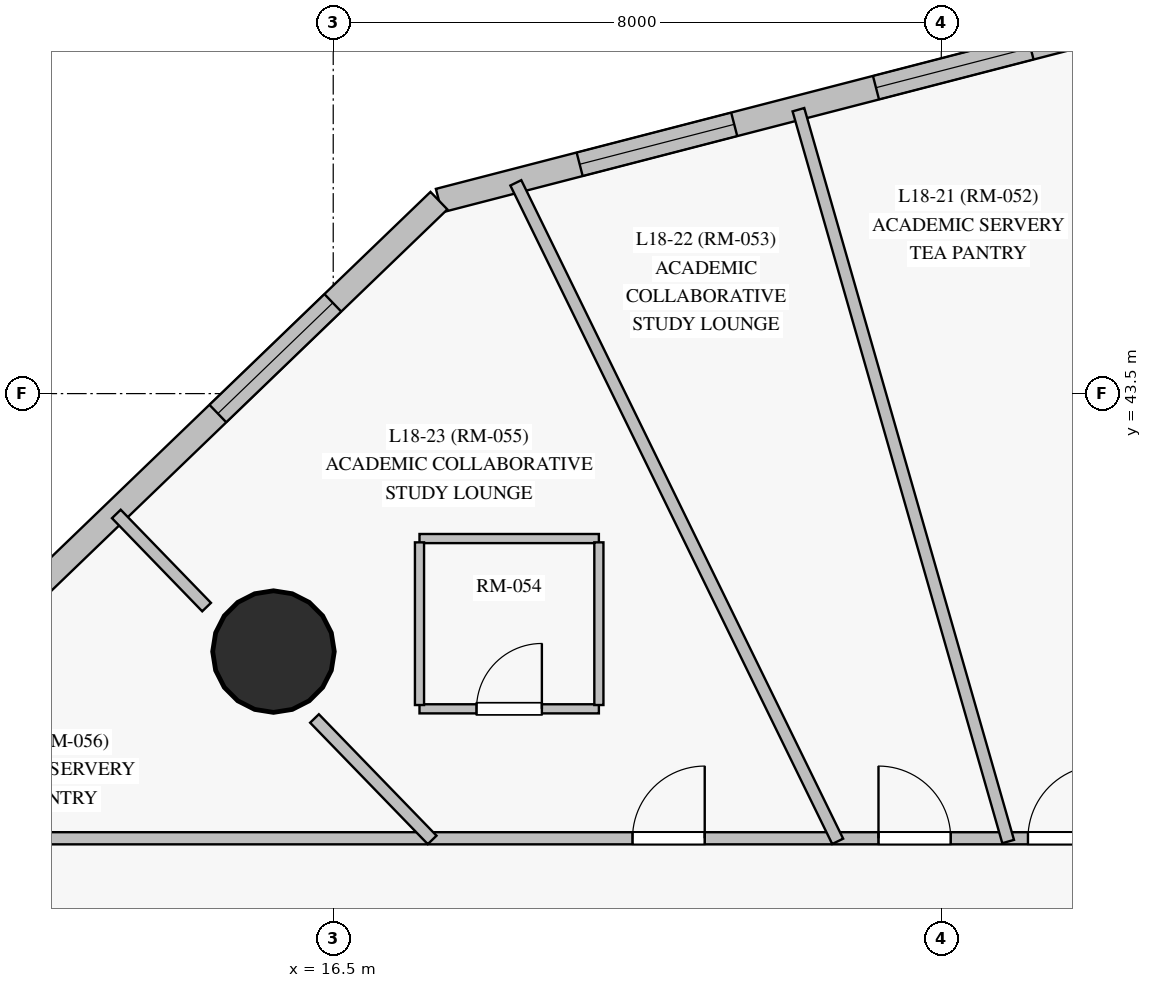
"""IFC4 building model, lengths in metres.
Left out: names, types, materials, properties, quantities, classifications, styles, units other than length and angle.
Written with IfcOpenShell. Run it as: python <this file> out.ifc"""

import sys

from ifc_helpers import new_model, si_unit, direction, frame, frame_2d, origin, origin_with_axes, origin_2d, place, context, subcontext, project, spatial, rectangle, circle, extrude, source, transform, mapped, element, fill, save


model = new_model("IFC4")
c1 = context("Model", 3, precision=1e-05, world=origin(), true_north=direction((0.0, 1.0)))
c2 = subcontext(c1, "Body", "Model", "MODEL_VIEW")
j1 = project(units=[si_unit("LENGTHUNIT", "METRE"), si_unit("PLANEANGLEUNIT", "RADIAN")], contexts=[c1])
p1 = place(None, origin())
s1 = spatial("IfcSite", under=j1, at=p1, CompositionType="ELEMENT")
p2 = place(p1, origin())
s2 = spatial("IfcBuilding", under=s1, at=p2, CompositionType="ELEMENT")
p3 = place(p2, frame((0.0, 0.0, 69.7)))
s3 = spatial("IfcBuildingStorey", under=s2, at=p3, CompositionType="ELEMENT", Elevation=69.7)
m1 = source(origin_with_axes(), c2, "Body", "SweptSolid", [
    extrude(circle(Radius=0.8, at=origin_2d()), origin(), (0.0, 0.0, 1.0), 3.6),
])
p4 = place(p3, frame((15.714, 40.106, 0.0), z_axis=(0.0, 0.0, 1.0), x_axis=(1.0, 0.0, 0.0)))
e1 = element("IfcColumn", 1, at=p4, inside=s3, PredefinedType="COLUMN", context=c2, shape_type="MappedRepresentation", body=[
    mapped(m1, transform((0.0, 0.0, 0.0), scale=1.0)),
])
p5 = place(p3, frame((32.152, 49.724, 0.0), z_axis=(0.0, 0.0, 1.0), x_axis=(-0.968190331719, -0.250214870793, 0.0)))
e2 = element("IfcWall", 2, at=p5, inside=s3, PredefinedType="SOLIDWALL", context=c2, shape_type="SweptSolid", body=[
    extrude(rectangle(XDim=14.729, YDim=0.32, at=frame_2d((7.365, 0.0))), origin(), (0.0, 0.0, 1.0), 3.35),
])
p6 = place(p5, frame((1.795, 0.0, 0.85)))
e3 = element("IfcOpeningElement", 3, at=p6, cuts=e2, PredefinedType="OPENING", context=c2, shape_type="SweptSolid", body=[
    extrude(rectangle(XDim=2.1, YDim=1.95, at=frame_2d((1.05, 0.975))), frame((0.0, 0.17, 0.0), z_axis=(0.0, -1.0, 0.0), x_axis=(1.0, 0.0, 0.0)), (0.0, 0.0, 1.0), 0.34),
])
p7 = place(p5, frame((6.691, 0.0, 0.85)))
e4 = element("IfcOpeningElement", 4, at=p7, cuts=e2, PredefinedType="OPENING", context=c2, shape_type="SweptSolid", body=[
    extrude(rectangle(XDim=2.1, YDim=1.95, at=frame_2d((1.05, 0.975))), frame((0.0, 0.17, 0.0), z_axis=(0.0, -1.0, 0.0), x_axis=(1.0, 0.0, 0.0)), (0.0, 0.0, 1.0), 0.34),
])
p8 = place(p5, frame((10.717, 0.0, 0.85)))
e5 = element("IfcOpeningElement", 5, at=p8, cuts=e2, PredefinedType="OPENING", context=c2, shape_type="SweptSolid", body=[
    extrude(rectangle(XDim=2.1, YDim=1.95, at=frame_2d((1.05, 0.975))), frame((0.0, 0.17, 0.0), z_axis=(0.0, -1.0, 0.0), x_axis=(1.0, 0.0, 0.0)), (0.0, 0.0, 1.0), 0.34),
])
p9 = place(p3, frame((17.891, 46.039, 0.0), z_axis=(0.0, 0.0, 1.0), x_axis=(-0.720301487299, -0.693661132971, 0.0)))
e6 = element("IfcWall", 6, at=p9, inside=s3, PredefinedType="SOLIDWALL", context=c2, shape_type="SweptSolid", body=[
    extrude(rectangle(XDim=11.822, YDim=0.32, at=frame_2d((5.911, 0.0))), origin(), (0.0, 0.0, 1.0), 3.35),
])
p10 = place(p9, frame((1.938, 0.0, 0.85)))
e7 = element("IfcOpeningElement", 7, at=p10, cuts=e6, PredefinedType="OPENING", context=c2, shape_type="SweptSolid", body=[
    extrude(rectangle(XDim=2.1, YDim=1.95, at=frame_2d((1.05, 0.975))), frame((0.0, 0.17, 0.0), z_axis=(0.0, -1.0, 0.0), x_axis=(1.0, 0.0, 0.0)), (0.0, 0.0, 1.0), 0.34),
])
p11 = place(p9, frame((7.789, 0.0, 0.85)))
e8 = element("IfcOpeningElement", 8, at=p11, cuts=e6, PredefinedType="OPENING", context=c2, shape_type="SweptSolid", body=[
    extrude(rectangle(XDim=2.1, YDim=1.95, at=frame_2d((1.05, 0.975))), frame((0.0, 0.17, 0.0), z_axis=(0.0, -1.0, 0.0), x_axis=(1.0, 0.0, 0.0)), (0.0, 0.0, 1.0), 0.34),
])
p12 = place(p3, frame((10.5, 37.65, 0.0), z_axis=(0.0, 0.0, 1.0), x_axis=(1.0, 0.0, 0.0)))
e9 = element("IfcWall", 9, at=p12, inside=s3, PredefinedType="PARTITIONING", context=c2, shape_type="SweptSolid", body=[
    extrude(rectangle(XDim=29.75, YDim=0.16, at=frame_2d((14.875, 0.0))), origin(), (0.0, 0.0, 1.0), 2.75),
])
p13 = place(p12, frame((27.85, 0.0, 0.0)))
e10 = element("IfcOpeningElement", 10, at=p13, cuts=e9, PredefinedType="OPENING", context=c2, shape_type="SweptSolid", body=[
    extrude(rectangle(XDim=0.95, YDim=2.15, at=frame_2d((0.475, 1.075))), frame((0.0, 0.09, 0.0), z_axis=(0.0, -1.0, 0.0), x_axis=(1.0, 0.0, 0.0)), (0.0, 0.0, 1.0), 0.18),
])
p14 = place(p12, frame((25.159, 0.0, 0.0)))
e11 = element("IfcOpeningElement", 11, at=p14, cuts=e9, PredefinedType="OPENING", context=c2, shape_type="SweptSolid", body=[
    extrude(rectangle(XDim=0.96, YDim=2.15, at=frame_2d((0.48, 1.075))), frame((0.0, 0.09, 0.0), z_axis=(0.0, -1.0, 0.0), x_axis=(1.0, 0.0, 0.0)), (0.0, 0.0, 1.0), 0.18),
])
p15 = place(p12, frame((21.837, 0.0, 0.0)))
e12 = element("IfcOpeningElement", 12, at=p15, cuts=e9, PredefinedType="OPENING", context=c2, shape_type="SweptSolid", body=[
    extrude(rectangle(XDim=0.95, YDim=2.15, at=frame_2d((0.475, 1.075))), frame((0.0, 0.09, 0.0), z_axis=(0.0, -1.0, 0.0), x_axis=(1.0, 0.0, 0.0)), (0.0, 0.0, 1.0), 0.18),
])
p16 = place(p12, frame((18.863, 0.0, 0.0)))
e13 = element("IfcOpeningElement", 13, at=p16, cuts=e9, PredefinedType="OPENING", context=c2, shape_type="SweptSolid", body=[
    extrude(rectangle(XDim=0.95, YDim=2.15, at=frame_2d((0.475, 1.075))), frame((0.0, 0.09, 0.0), z_axis=(0.0, -1.0, 0.0), x_axis=(1.0, 0.0, 0.0)), (0.0, 0.0, 1.0), 0.18),
])
p17 = place(p12, frame((15.14, 0.0, 0.0)))
e14 = element("IfcOpeningElement", 14, at=p17, cuts=e9, PredefinedType="OPENING", context=c2, shape_type="SweptSolid", body=[
    extrude(rectangle(XDim=0.96, YDim=2.15, at=frame_2d((0.48, 1.075))), frame((0.0, 0.09, 0.0), z_axis=(0.0, -1.0, 0.0), x_axis=(1.0, 0.0, 0.0)), (0.0, 0.0, 1.0), 0.18),
])
p18 = place(p12, frame((13.174, 0.0, 0.0)))
e15 = element("IfcOpeningElement", 15, at=p18, cuts=e9, PredefinedType="OPENING", context=c2, shape_type="SweptSolid", body=[
    extrude(rectangle(XDim=0.95, YDim=2.15, at=frame_2d((0.475, 1.075))), frame((0.0, 0.09, 0.0), z_axis=(0.0, -1.0, 0.0), x_axis=(1.0, 0.0, 0.0)), (0.0, 0.0, 1.0), 0.18),
])
p19 = place(p12, frame((9.938, 0.0, 0.0)))
e16 = element("IfcOpeningElement", 16, at=p19, cuts=e9, PredefinedType="OPENING", context=c2, shape_type="SweptSolid", body=[
    extrude(rectangle(XDim=0.95, YDim=2.15, at=frame_2d((0.475, 1.075))), frame((0.0, 0.09, 0.0), z_axis=(0.0, -1.0, 0.0), x_axis=(1.0, 0.0, 0.0)), (0.0, 0.0, 1.0), 0.18),
])
p20 = place(p3, frame((25.379, 37.607, 0.0), z_axis=(0.0, 0.0, 1.0), x_axis=(-0.275487246275, 0.961304726473, 0.0)))
e17 = element("IfcWall", 17, at=p20, inside=s3, PredefinedType="PARTITIONING", context=c2, shape_type="SweptSolid", body=[
    extrude(rectangle(XDim=10.016, YDim=0.16, at=frame_2d((5.008, 0.0))), origin(), (0.0, 0.0, 1.0), 3.35),
])
p21 = place(p3, frame((23.137, 37.61, 0.0), z_axis=(0.0, 0.0, 1.0), x_axis=(-0.439133840218, 0.898421655113, 0.0)))
e18 = element("IfcWall", 18, at=p21, inside=s3, PredefinedType="PARTITIONING", context=c2, shape_type="SweptSolid", body=[
    extrude(rectangle(XDim=9.643, YDim=0.16, at=frame_2d((4.821, 0.0))), origin(), (0.0, 0.0, 1.0), 3.35),
])
p22 = place(p3, frame((17.635, 39.353, 0.0), z_axis=(0.0, 0.0, 1.0), x_axis=(1.0, 0.0, 0.0)))
e19 = element("IfcWall", 19, at=p22, inside=s3, PredefinedType="PARTITIONING", context=c2, shape_type="SweptSolid", body=[
    extrude(rectangle(XDim=2.36, YDim=0.12, at=frame_2d((1.18, 0.0))), origin(), (0.0, 0.0, 1.0), 2.75),
])
p23 = place(p22, frame((0.75, 0.0, 0.0)))
e20 = element("IfcOpeningElement", 20, at=p23, cuts=e19, PredefinedType="OPENING", context=c2, shape_type="SweptSolid", body=[
    extrude(rectangle(XDim=0.86, YDim=2.1, at=frame_2d((0.43, 1.05))), frame((0.0, 0.07, 0.0), z_axis=(0.0, -1.0, 0.0), x_axis=(1.0, 0.0, 0.0)), (0.0, 0.0, 1.0), 0.14),
])
p24 = place(p3, frame((19.995, 41.593, 0.0), z_axis=(0.0, 0.0, 1.0), x_axis=(-1.0, 0.0, 0.0)))
e21 = element("IfcWall", 21, at=p24, inside=s3, PredefinedType="PARTITIONING", context=c2, shape_type="SweptSolid", body=[
    extrude(rectangle(XDim=2.36, YDim=0.12, at=frame_2d((1.18, 0.0))), origin(), (0.0, 0.0, 1.0), 2.75),
])
p25 = place(p3, frame((17.802, 37.628, 0.0), z_axis=(0.0, 0.0, 1.0), x_axis=(-0.695823523946, 0.718212798218, 0.0)))
e22 = element("IfcWall", 22, at=p25, inside=s3, PredefinedType="PARTITIONING", context=c2, shape_type="SweptSolid", body=[
    extrude(rectangle(XDim=2.225, YDim=0.16, at=frame_2d((1.112, 0.0))), origin(), (0.0, 0.0, 1.0), 2.7),
])
for number, where, z_axis, x_axis in (
    (23, (19.995, 39.403, 0.0), (0.0, 0.0, 1.0), (0.0, 1.0, 0.0)),
    (24, (17.635, 41.543, 0.0), (0.0, 0.0, 1.0), (0.0, -1.0, 0.0)),
):
    element("IfcWall", number, at=place(p3, frame(where, z_axis=z_axis, x_axis=x_axis)), inside=s3, PredefinedType="PARTITIONING", context=c2, shape_type="SweptSolid", body=[
        extrude(rectangle(XDim=2.14, YDim=0.12, at=frame_2d((1.07, 0.0))), origin(), (0.0, 0.0, 1.0), 3.35),
    ])
p26 = place(p3, frame((14.834, 40.691, 0.0), z_axis=(0.0, 0.0, 1.0), x_axis=(-0.695931289597, 0.718108376333, 0.0)))
e25 = element("IfcWall", 25, at=p26, inside=s3, PredefinedType="PARTITIONING", context=c2, shape_type="SweptSolid", body=[
    extrude(rectangle(XDim=1.706, YDim=0.16, at=frame_2d((0.853, 0.0))), origin(), (0.0, 0.0, 1.0), 3.35),
])
m2 = source(origin_with_axes(), c2, "Body", "SweptSolid", [
    extrude(rectangle(XDim=2.1, YDim=1.95, at=frame_2d((1.05, 0.975))), frame((0.0, 0.03, 0.0), z_axis=(0.0, -1.0, 0.0), x_axis=(1.0, 0.0, 0.0)), (0.0, 0.0, 1.0), 0.06),
])
p27 = place(p7, origin())
e26 = element("IfcWindow", 26, at=p27, inside=s3, PartitioningType="SINGLE_PANEL", PredefinedType="WINDOW", context=c2, shape_type="MappedRepresentation", body=[
    mapped(m2, transform((0.0, 0.0, 0.0), scale=1.0)),
])
fill(e4, e26)
p28 = place(p8, origin())
e27 = element("IfcWindow", 27, at=p28, inside=s3, PartitioningType="SINGLE_PANEL", PredefinedType="WINDOW", context=c2, shape_type="MappedRepresentation", body=[
    mapped(m2, transform((0.0, 0.0, 0.0), scale=1.0)),
])
fill(e5, e27)
p29 = place(p10, origin())
e28 = element("IfcWindow", 28, at=p29, inside=s3, PartitioningType="SINGLE_PANEL", PredefinedType="WINDOW", context=c2, shape_type="MappedRepresentation", body=[
    mapped(m2, transform((0.0, 0.0, 0.0), scale=1.0)),
])
fill(e7, e28)
m3 = source(origin_with_axes(), c2, "Body", "SweptSolid", [
    extrude(rectangle(XDim=0.86, YDim=2.1, at=frame_2d((0.43, 1.05))), frame((0.0, 0.025, 0.0), z_axis=(0.0, -1.0, 0.0), x_axis=(1.0, 0.0, 0.0)), (0.0, 0.0, 1.0), 0.05),
])
p30 = place(p23, origin())
e29 = element("IfcDoor", 29, at=p30, inside=s3, OperationType="SINGLE_SWING_RIGHT", PredefinedType="DOOR", context=c2, shape_type="MappedRepresentation", body=[
    mapped(m3, transform((0.0, 0.0, 0.0), scale=1.0)),
])
fill(e20, e29)
m4 = source(origin_with_axes(), c2, "Body", "SweptSolid", [
    extrude(rectangle(XDim=0.96, YDim=2.15, at=frame_2d((0.48, 1.075))), frame((0.0, 0.025, 0.0), z_axis=(0.0, -1.0, 0.0), x_axis=(1.0, 0.0, 0.0)), (0.0, 0.0, 1.0), 0.05),
])
p31 = place(p17, origin())
e30 = element("IfcDoor", 30, at=p31, inside=s3, OperationType="SINGLE_SWING_RIGHT", PredefinedType="DOOR", context=c2, shape_type="MappedRepresentation", body=[
    mapped(m4, transform((0.0, 0.0, 0.0), scale=1.0)),
])
fill(e14, e30)
m5 = source(origin_with_axes(), c2, "Body", "SweptSolid", [
    extrude(rectangle(XDim=0.95, YDim=2.15, at=frame_2d((0.475, 1.075))), frame((0.0, 0.025, 0.0), z_axis=(0.0, -1.0, 0.0), x_axis=(1.0, 0.0, 0.0)), (0.0, 0.0, 1.0), 0.05),
])
p32 = place(p18, origin())
e31 = element("IfcDoor", 31, at=p32, inside=s3, OperationType="SINGLE_SWING_LEFT", PredefinedType="DOOR", context=c2, shape_type="MappedRepresentation", body=[
    mapped(m5, transform((0.0, 0.0, 0.0), scale=1.0)),
])
fill(e15, e31)
p33 = place(p19, origin())
e32 = element("IfcDoor", 32, at=p33, inside=s3, OperationType="SINGLE_SWING_RIGHT", PredefinedType="DOOR", context=c2, shape_type="MappedRepresentation", body=[
    mapped(m5, transform((0.0, 0.0, 0.0), scale=1.0)),
])
fill(e16, e32)
save(model, sys.argv[1])
